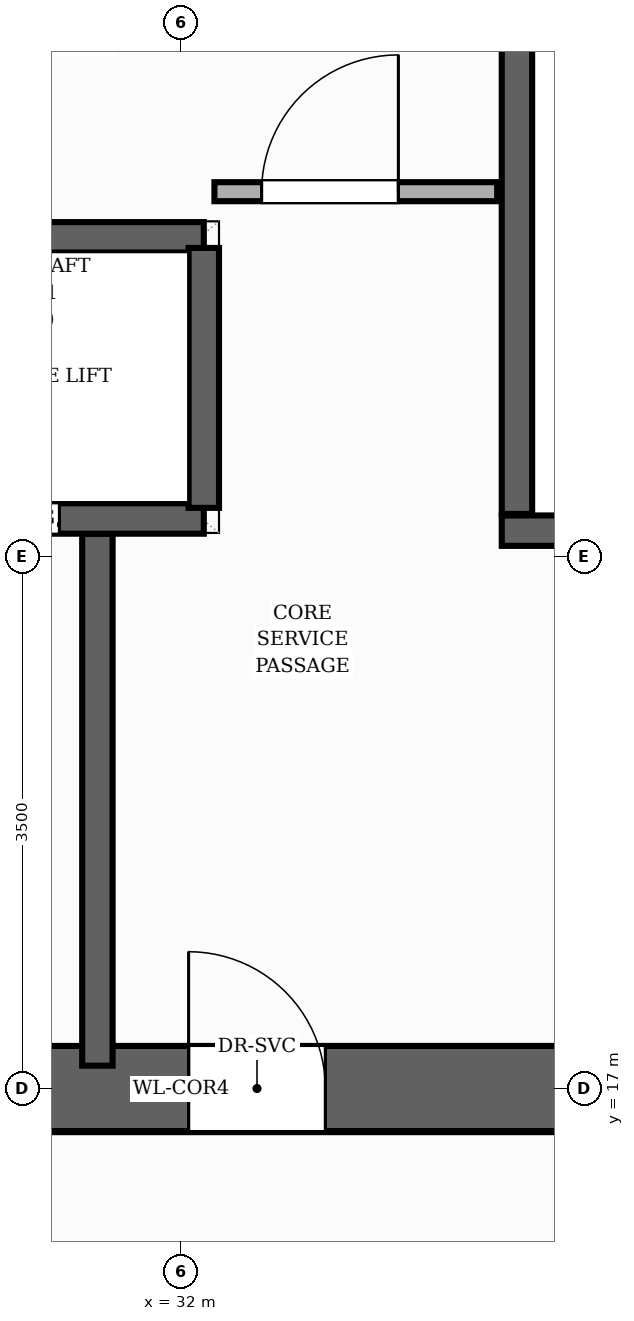
"""IFC4 building model, lengths in metres.
Left out: names, types, materials, properties, quantities, classifications, styles, units other than length and angle.
Written with IfcOpenShell. Run it as: python <this file> out.ifc"""

import sys

from ifc_helpers import new_model, si_unit, direction, frame, frame_2d, origin, place, context, subcontext, project, spatial, rectangle, extrude, element, fill, save


model = new_model("IFC4")
c1 = context("Model", 3, precision=1e-05, world=origin(), true_north=direction((0.0, 1.0)))
c2 = subcontext(c1, "Body", "Model", "MODEL_VIEW")
j1 = project(units=[si_unit("LENGTHUNIT", "METRE"), si_unit("PLANEANGLEUNIT", "RADIAN")], contexts=[c1])
p1 = place(None, origin())
s1 = spatial("IfcSite", under=j1, at=p1, CompositionType="ELEMENT")
p2 = place(p1, origin())
s2 = spatial("IfcBuilding", under=s1, at=p2, CompositionType="ELEMENT")
p3 = place(p2, frame((0.0, 0.0, 255.2)))
s3 = spatial("IfcBuildingStorey", under=s2, at=p3, CompositionType="ELEMENT", Elevation=255.2)
p4 = place(p3, frame((26.22, 17.0, 0.0), z_axis=(0.0, 0.0, 1.0), x_axis=(1.0, 0.0, 0.0)))
e1 = element("IfcWall", 1, at=p4, inside=s3, PredefinedType="SHEAR", context=c2, shape_type="SweptSolid", body=[
    extrude(rectangle(XDim=11.56, YDim=0.56, at=frame_2d((5.78, 0.0))), origin(), (0.0, 0.0, 1.0), 4.16),
])
p5 = place(p4, frame((2.28, 0.0, 0.0)))
e2 = element("IfcOpeningElement", 2, at=p5, cuts=e1, PredefinedType="OPENING", context=c2, shape_type="SweptSolid", body=[
    extrude(rectangle(XDim=1.1, YDim=2.15, at=frame_2d((0.55, 1.075))), frame((0.0, 0.29, 0.0), z_axis=(0.0, -1.0, 0.0), x_axis=(1.0, 0.0, 0.0)), (0.0, 0.0, 1.0), 0.58),
])
p6 = place(p4, frame((5.83, 0.0, 0.0)))
e3 = element("IfcOpeningElement", 3, at=p6, cuts=e1, PredefinedType="OPENING", context=c2, shape_type="SweptSolid", body=[
    extrude(rectangle(XDim=0.9, YDim=2.1, at=frame_2d((0.45, 1.05))), frame((0.0, 0.29, 0.0), z_axis=(0.0, -1.0, 0.0), x_axis=(1.0, 0.0, 0.0)), (0.0, 0.0, 1.0), 0.58),
])
p7 = place(p3, frame((34.21, 20.78, 0.0), z_axis=(0.0, 0.0, 1.0), x_axis=(0.0, 1.0, 0.0)))
e4 = element("IfcWall", 4, at=p7, inside=s3, PredefinedType="SHEAR", context=c2, shape_type="SweptSolid", body=[
    extrude(rectangle(XDim=6.44, YDim=0.2, at=frame_2d((3.22, 0.0))), origin(), (0.0, 0.0, 1.0), 4.16),
])
p8 = place(p3, frame((34.11, 20.67, 0.0), z_axis=(0.0, 0.0, 1.0), x_axis=(1.0, 0.0, 0.0)))
e5 = element("IfcWall", 5, at=p8, inside=s3, PredefinedType="SHEAR", context=c2, shape_type="SweptSolid", body=[
    extrude(rectangle(XDim=3.24, YDim=0.2, at=frame_2d((1.62, 0.0))), origin(), (0.0, 0.0, 1.0), 4.16),
])
p9 = place(p3, frame((31.45, 17.15, 0.0), z_axis=(0.0, 0.0, 1.0), x_axis=(0.0, 1.0, 0.0)))
e6 = element("IfcWall", 6, at=p9, inside=s3, PredefinedType="SHEAR", context=c2, shape_type="SweptSolid", body=[
    extrude(rectangle(XDim=3.5, YDim=0.2, at=frame_2d((1.75, 0.0))), origin(), (0.0, 0.0, 1.0), 4.16),
])
p10 = place(p3, frame((29.85, 20.75, 0.0), z_axis=(0.0, 0.0, 1.0), x_axis=(1.0, 0.0, 0.0)))
e7 = element("IfcWall", 7, at=p10, inside=s3, PredefinedType="SHEAR", context=c2, shape_type="SweptSolid", body=[
    extrude(rectangle(XDim=2.3, YDim=0.2, at=frame_2d((1.15, 0.0))), origin(), (0.0, 0.0, 1.0), 4.16),
])
p11 = place(p10, frame((0.25, 0.0, 0.0)))
e8 = element("IfcOpeningElement", 8, at=p11, cuts=e7, PredefinedType="OPENING", context=c2, shape_type="SweptSolid", body=[
    extrude(rectangle(XDim=1.1, YDim=2.15, at=frame_2d((0.55, 1.075))), frame((0.0, 0.11, 0.0), z_axis=(0.0, -1.0, 0.0), x_axis=(1.0, 0.0, 0.0)), (0.0, 0.0, 1.0), 0.22),
])
p12 = place(p3, frame((29.85, 22.6, 0.0), z_axis=(0.0, 0.0, 1.0), x_axis=(1.0, 0.0, 0.0)))
e9 = element("IfcWall", 9, at=p12, inside=s3, PredefinedType="SHEAR", context=c2, shape_type="SweptSolid", body=[
    extrude(rectangle(XDim=2.3, YDim=0.2, at=frame_2d((1.15, 0.0))), origin(), (0.0, 0.0, 1.0), 4.16),
])
p13 = place(p3, frame((32.15, 20.82, 0.0), z_axis=(0.0, 0.0, 1.0), x_axis=(0.0, 1.0, 0.0)))
e10 = element("IfcWall", 10, at=p13, inside=s3, PredefinedType="SHEAR", context=c2, shape_type="SweptSolid", body=[
    extrude(rectangle(XDim=1.71, YDim=0.2, at=frame_2d((0.855, 0.0))), origin(), (0.0, 0.0, 1.0), 4.16),
])
p14 = place(p3, frame((32.22, 22.9, 0.0), z_axis=(0.0, 0.0, 1.0), x_axis=(1.0, 0.0, 0.0)))
e11 = element("IfcWall", 11, at=p14, inside=s3, PredefinedType="PARTITIONING", context=c2, shape_type="SweptSolid", body=[
    extrude(rectangle(XDim=1.86, YDim=0.125, at=frame_2d((0.93, 0.0))), origin(), (0.0, 0.0, 1.0), 3.905),
])
p15 = place(p14, frame((0.31, 0.0, 0.0)))
e12 = element("IfcOpeningElement", 12, at=p15, cuts=e11, PredefinedType="OPENING", context=c2, shape_type="SweptSolid", body=[
    extrude(rectangle(XDim=0.9, YDim=2.1, at=frame_2d((0.45, 1.05))), frame((0.0, 0.073, 0.0), z_axis=(0.0, -1.0, 0.0), x_axis=(1.0, 0.0, 0.0)), (0.0, 0.0, 1.0), 0.145),
])
p16 = place(p11, origin())
e13 = element("IfcDoor", 13, at=p16, inside=s3, OperationType="DOUBLE_DOOR_SLIDING", PredefinedType="DOOR", context=c2, shape_type="SweptSolid", body=[
    extrude(rectangle(XDim=1.1, YDim=2.15, at=frame_2d((0.55, 1.075))), frame((0.0, 0.025, 0.0), z_axis=(0.0, -1.0, 0.0), x_axis=(1.0, 0.0, 0.0)), (0.0, 0.0, 1.0), 0.05),
])
fill(e8, e13)
p17 = place(p6, origin())
e14 = element("IfcDoor", 14, at=p17, inside=s3, OperationType="SINGLE_SWING_LEFT", PredefinedType="DOOR", context=c2, shape_type="SweptSolid", body=[
    extrude(rectangle(XDim=0.9, YDim=2.1, at=frame_2d((0.45, 1.05))), frame((0.0, 0.025, 0.0), z_axis=(0.0, -1.0, 0.0), x_axis=(1.0, 0.0, 0.0)), (0.0, 0.0, 1.0), 0.05),
])
fill(e3, e14)
p18 = place(p15, origin())
e15 = element("IfcDoor", 15, at=p18, inside=s3, OperationType="SINGLE_SWING_RIGHT", PredefinedType="DOOR", context=c2, shape_type="SweptSolid", body=[
    extrude(rectangle(XDim=0.9, YDim=2.1, at=frame_2d((0.45, 1.05))), frame((0.0, 0.025, 0.0), z_axis=(0.0, -1.0, 0.0), x_axis=(1.0, 0.0, 0.0)), (0.0, 0.0, 1.0), 0.05),
])
fill(e12, e15)
save(model, sys.argv[1])
